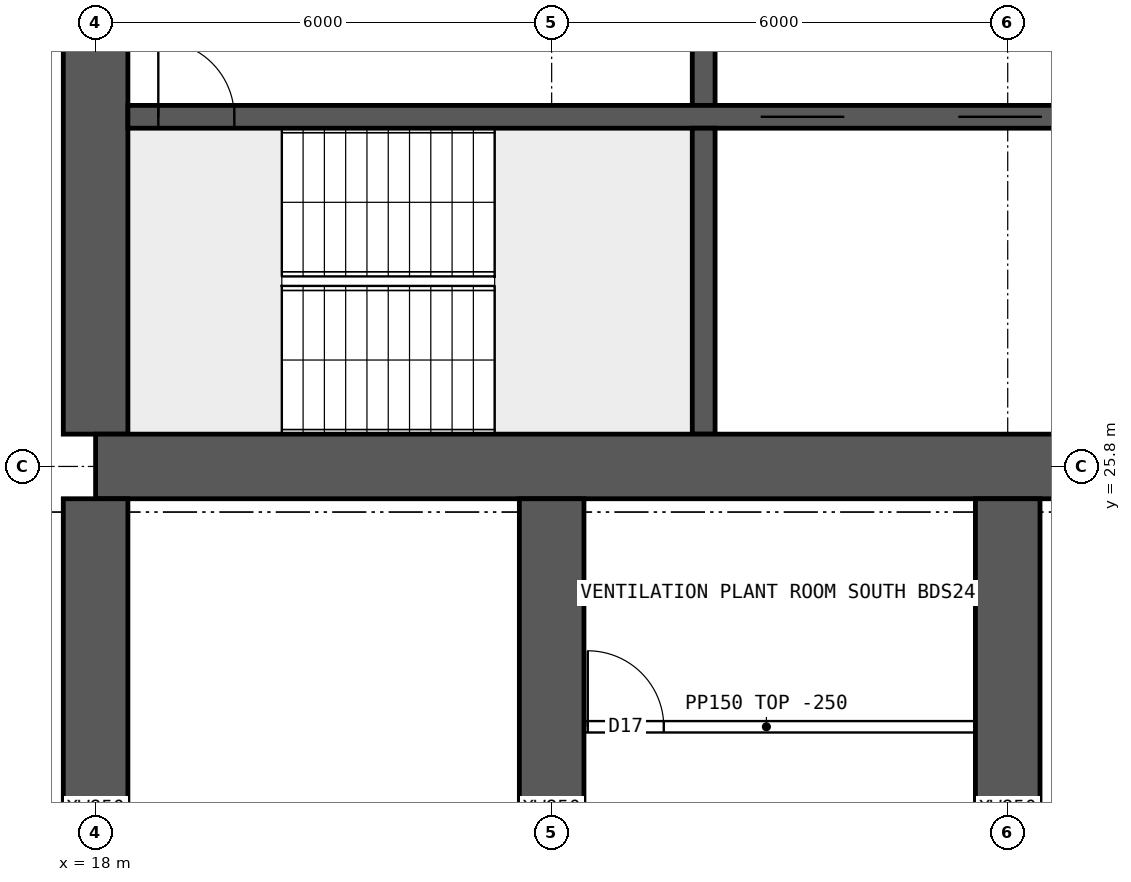
"""IFC4 building model, lengths in metres.
Left out: names, types, materials, properties, quantities, classifications, styles, units other than length and angle.
Written with IfcOpenShell. Run it as: python <this file> out.ifc"""

import sys

from ifc_helpers import new_model, si_unit, direction, frame, frame_2d, origin, place, context, subcontext, project, spatial, rectangle, extrude, element, fill, save


model = new_model("IFC4")
c1 = context("Model", 3, precision=1e-05, world=origin(), true_north=direction((0.0, 1.0)))
c2 = subcontext(c1, "Body", "Model", "MODEL_VIEW")
j1 = project(units=[si_unit("LENGTHUNIT", "METRE"), si_unit("PLANEANGLEUNIT", "RADIAN")], contexts=[c1])
p1 = place(None, origin())
s1 = spatial("IfcSite", under=j1, at=p1, CompositionType="ELEMENT")
p2 = place(p1, origin())
s2 = spatial("IfcBuilding", under=s1, at=p2, CompositionType="ELEMENT")
p3 = place(p2, frame((0.0, 0.0, 152.35)))
s3 = spatial("IfcBuildingStorey", under=s2, at=p3, CompositionType="ELEMENT", Elevation=152.35)
p4 = place(p3, frame((18.0, 25.8, 0.0), z_axis=(0.0, 0.0, 1.0), x_axis=(1.0, 0.0, 0.0)))
e1 = element("IfcWall", 1, at=p4, inside=s3, PredefinedType="SHEAR", context=c2, shape_type="SweptSolid", body=[
    extrude(rectangle(XDim=48.0, YDim=0.85, at=frame_2d((24.0, 0.0))), origin(), (0.0, 0.0, 1.0), 3.75),
])
p5 = place(p3, frame((18.0, 26.225, 0.0), z_axis=(0.0, 0.0, 1.0), x_axis=(0.0, 1.0, 0.0)))
e2 = element("IfcWall", 2, at=p5, inside=s3, PredefinedType="SHEAR", context=c2, shape_type="SweptSolid", body=[
    extrude(rectangle(XDim=11.55, YDim=0.85, at=frame_2d((5.775, 0.0))), origin(), (0.0, 0.0, 1.0), 3.75),
])
p6 = place(p5, frame((5.075, 0.0, 0.0)))
e3 = element("IfcOpeningElement", 3, at=p6, cuts=e2, PredefinedType="OPENING", context=c2, shape_type="SweptSolid", body=[
    extrude(rectangle(XDim=1.2, YDim=2.1, at=frame_2d((0.6, 1.05))), frame((0.0, 0.435, 0.0), z_axis=(0.0, -1.0, 0.0), x_axis=(1.0, 0.0, 0.0)), (0.0, 0.0, 1.0), 0.87),
])
p7 = place(p3, frame((18.425, 30.4, 0.0), z_axis=(0.0, 0.0, 1.0), x_axis=(1.0, 0.0, 0.0)))
e4 = element("IfcWall", 4, at=p7, inside=s3, PredefinedType="SHEAR", context=c2, shape_type="SweptSolid", body=[
    extrude(rectangle(XDim=47.15, YDim=0.3, at=frame_2d((23.575, 0.0))), origin(), (0.0, 0.0, 1.0), 3.75),
])
p8 = place(p7, frame((0.4, 0.0, 0.0)))
e5 = element("IfcOpeningElement", 5, at=p8, cuts=e4, PredefinedType="OPENING", context=c2, shape_type="SweptSolid", body=[
    extrude(rectangle(XDim=1.0, YDim=2.1, at=frame_2d((0.5, 1.05))), frame((0.0, 0.16, 0.0), z_axis=(0.0, -1.0, 0.0), x_axis=(1.0, 0.0, 0.0)), (0.0, 0.0, 1.0), 0.32),
])
p9 = place(p7, frame((45.75, 0.0, 0.0)))
e6 = element("IfcOpeningElement", 6, at=p9, cuts=e4, PredefinedType="OPENING", context=c2, shape_type="SweptSolid", body=[
    extrude(rectangle(XDim=1.0, YDim=2.1, at=frame_2d((0.5, 1.05))), frame((0.0, 0.16, 0.0), z_axis=(0.0, -1.0, 0.0), x_axis=(1.0, 0.0, 0.0)), (0.0, 0.0, 1.0), 0.32),
])
p10 = place(p7, frame((8.325, 0.0, 0.0)))
e7 = element("IfcOpeningElement", 7, at=p10, cuts=e4, PredefinedType="OPENING", context=c2, shape_type="SweptSolid", body=[
    extrude(rectangle(XDim=1.1, YDim=2.1, at=frame_2d((0.55, 1.05))), frame((0.0, 0.16, 0.0), z_axis=(0.0, -1.0, 0.0), x_axis=(1.0, 0.0, 0.0)), (0.0, 0.0, 1.0), 0.32),
])
p11 = place(p7, frame((10.925, 0.0, 0.0)))
e8 = element("IfcOpeningElement", 8, at=p11, cuts=e4, PredefinedType="OPENING", context=c2, shape_type="SweptSolid", body=[
    extrude(rectangle(XDim=1.1, YDim=2.1, at=frame_2d((0.55, 1.05))), frame((0.0, 0.16, 0.0), z_axis=(0.0, -1.0, 0.0), x_axis=(1.0, 0.0, 0.0)), (0.0, 0.0, 1.0), 0.32),
])
p12 = place(p7, frame((13.525, 0.0, 0.0)))
e9 = element("IfcOpeningElement", 9, at=p12, cuts=e4, PredefinedType="OPENING", context=c2, shape_type="SweptSolid", body=[
    extrude(rectangle(XDim=1.1, YDim=2.1, at=frame_2d((0.55, 1.05))), frame((0.0, 0.16, 0.0), z_axis=(0.0, -1.0, 0.0), x_axis=(1.0, 0.0, 0.0)), (0.0, 0.0, 1.0), 0.32),
])
p13 = place(p7, frame((16.125, 0.0, 0.0)))
e10 = element("IfcOpeningElement", 10, at=p13, cuts=e4, PredefinedType="OPENING", context=c2, shape_type="SweptSolid", body=[
    extrude(rectangle(XDim=1.1, YDim=2.1, at=frame_2d((0.55, 1.05))), frame((0.0, 0.16, 0.0), z_axis=(0.0, -1.0, 0.0), x_axis=(1.0, 0.0, 0.0)), (0.0, 0.0, 1.0), 0.32),
])
p14 = place(p7, frame((18.9, 0.0, 0.0)))
e11 = element("IfcOpeningElement", 11, at=p14, cuts=e4, PredefinedType="OPENING", context=c2, shape_type="SweptSolid", body=[
    extrude(rectangle(XDim=0.9, YDim=2.1, at=frame_2d((0.45, 1.05))), frame((0.0, 0.16, 0.0), z_axis=(0.0, -1.0, 0.0), x_axis=(1.0, 0.0, 0.0)), (0.0, 0.0, 1.0), 0.32),
])
p15 = place(p7, frame((30.192, 0.0, 0.0)))
e12 = element("IfcOpeningElement", 12, at=p15, cuts=e4, PredefinedType="OPENING", context=c2, shape_type="SweptSolid", body=[
    extrude(rectangle(XDim=1.1, YDim=2.1, at=frame_2d((0.55, 1.05))), frame((0.0, 0.16, 0.0), z_axis=(0.0, -1.0, 0.0), x_axis=(1.0, 0.0, 0.0)), (0.0, 0.0, 1.0), 0.32),
])
p16 = place(p7, frame((33.725, 0.0, 0.0)))
e13 = element("IfcOpeningElement", 13, at=p16, cuts=e4, PredefinedType="OPENING", context=c2, shape_type="SweptSolid", body=[
    extrude(rectangle(XDim=1.1, YDim=2.1, at=frame_2d((0.55, 1.05))), frame((0.0, 0.16, 0.0), z_axis=(0.0, -1.0, 0.0), x_axis=(1.0, 0.0, 0.0)), (0.0, 0.0, 1.0), 0.32),
])
p17 = place(p7, frame((37.258, 0.0, 0.0)))
e14 = element("IfcOpeningElement", 14, at=p17, cuts=e4, PredefinedType="OPENING", context=c2, shape_type="SweptSolid", body=[
    extrude(rectangle(XDim=1.1, YDim=2.1, at=frame_2d((0.55, 1.05))), frame((0.0, 0.16, 0.0), z_axis=(0.0, -1.0, 0.0), x_axis=(1.0, 0.0, 0.0)), (0.0, 0.0, 1.0), 0.32),
])
p18 = place(p3, frame((26.0, 26.225, 0.0), z_axis=(0.0, 0.0, 1.0), x_axis=(0.0, 1.0, 0.0)))
e15 = element("IfcWall", 15, at=p18, inside=s3, PredefinedType="SHEAR", context=c2, shape_type="SweptSolid", body=[
    extrude(rectangle(XDim=4.025, YDim=0.3, at=frame_2d((2.012, 0.0))), origin(), (0.0, 0.0, 1.0), 3.75),
])
p19 = place(p3, frame((26.0, 30.55, 0.0), z_axis=(0.0, 0.0, 1.0), x_axis=(0.0, 1.0, 0.0)))
e16 = element("IfcWall", 16, at=p19, inside=s3, PredefinedType="SHEAR", context=c2, shape_type="SweptSolid", body=[
    extrude(rectangle(XDim=3.9, YDim=0.3, at=frame_2d((1.95, 0.0))), origin(), (0.0, 0.0, 1.0), 3.75),
])
p20 = place(p19, frame((1.4, 0.0, 0.0)))
e17 = element("IfcOpeningElement", 17, at=p20, cuts=e16, PredefinedType="OPENING", context=c2, shape_type="SweptSolid", body=[
    extrude(rectangle(XDim=1.2, YDim=2.1, at=frame_2d((0.6, 1.05))), frame((0.0, 0.16, 0.0), z_axis=(0.0, -1.0, 0.0), x_axis=(1.0, 0.0, 0.0)), (0.0, 0.0, 1.0), 0.32),
])
for number, where, z_axis, x_axis in (
    (18, (18.0, 17.2, 0.0), (0.0, 0.0, 1.0), (0.0, 1.0, 0.0)),
    (19, (24.0, 17.2, 0.0), (0.0, 0.0, 1.0), (0.0, 1.0, 0.0)),
    (20, (30.0, 17.2, 0.0), (0.0, 0.0, 1.0), (0.0, 1.0, 0.0)),
):
    element("IfcWall", number, at=place(p3, frame(where, z_axis=z_axis, x_axis=x_axis)), inside=s3, PredefinedType="SHEAR", context=c2, shape_type="SweptSolid", body=[
        extrude(rectangle(XDim=8.175, YDim=0.85, at=frame_2d((4.087, 0.0))), origin(), (0.0, 0.0, 1.0), 3.75),
    ])
p21 = place(p3, frame((24.075, 22.375, 0.0), z_axis=(0.0, 0.0, 1.0), x_axis=(1.0, 0.0, 0.0)))
e21 = element("IfcWall", 21, at=p21, inside=s3, PredefinedType="PARTITIONING", context=c2, shape_type="SweptSolid", body=[
    extrude(rectangle(XDim=5.5, YDim=0.15, at=frame_2d((2.75, 0.0))), origin(), (0.0, 0.0, 1.0), 3.5),
])
p22 = place(p21, frame((0.4, 0.0, 0.0)))
e22 = element("IfcOpeningElement", 22, at=p22, cuts=e21, PredefinedType="OPENING", context=c2, shape_type="SweptSolid", body=[
    extrude(rectangle(XDim=1.0, YDim=2.1, at=frame_2d((0.5, 1.05))), frame((0.0, 0.085, 0.0), z_axis=(0.0, -1.0, 0.0), x_axis=(1.0, 0.0, 0.0)), (0.0, 0.0, 1.0), 0.17),
])
p23 = place(p8, origin())
e23 = element("IfcDoor", 23, at=p23, inside=s3, OperationType="SINGLE_SWING_LEFT", PredefinedType="DOOR", context=c2, shape_type="SweptSolid", body=[
    extrude(rectangle(XDim=1.0, YDim=2.1, at=frame_2d((0.5, 1.05))), frame((0.0, 0.025, 0.0), z_axis=(0.0, -1.0, 0.0), x_axis=(1.0, 0.0, 0.0)), (0.0, 0.0, 1.0), 0.05),
])
fill(e5, e23)
p24 = place(p10, origin())
e24 = element("IfcDoor", 24, at=p24, inside=s3, OperationType="DOUBLE_DOOR_SLIDING", PredefinedType="DOOR", context=c2, shape_type="SweptSolid", body=[
    extrude(rectangle(XDim=1.1, YDim=2.1, at=frame_2d((0.55, 1.05))), frame((0.0, 0.025, 0.0), z_axis=(0.0, -1.0, 0.0), x_axis=(1.0, 0.0, 0.0)), (0.0, 0.0, 1.0), 0.05),
])
fill(e7, e24)
p25 = place(p11, origin())
e25 = element("IfcDoor", 25, at=p25, inside=s3, OperationType="DOUBLE_DOOR_SLIDING", PredefinedType="DOOR", context=c2, shape_type="SweptSolid", body=[
    extrude(rectangle(XDim=1.1, YDim=2.1, at=frame_2d((0.55, 1.05))), frame((0.0, 0.025, 0.0), z_axis=(0.0, -1.0, 0.0), x_axis=(1.0, 0.0, 0.0)), (0.0, 0.0, 1.0), 0.05),
])
fill(e8, e25)
p26 = place(p22, origin())
e26 = element("IfcDoor", 26, at=p26, inside=s3, OperationType="SINGLE_SWING_LEFT", PredefinedType="DOOR", context=c2, shape_type="SweptSolid", body=[
    extrude(rectangle(XDim=1.0, YDim=2.1, at=frame_2d((0.5, 1.05))), frame((0.0, 0.025, 0.0), z_axis=(0.0, -1.0, 0.0), x_axis=(1.0, 0.0, 0.0)), (0.0, 0.0, 1.0), 0.05),
])
fill(e22, e26)
save(model, sys.argv[1])
